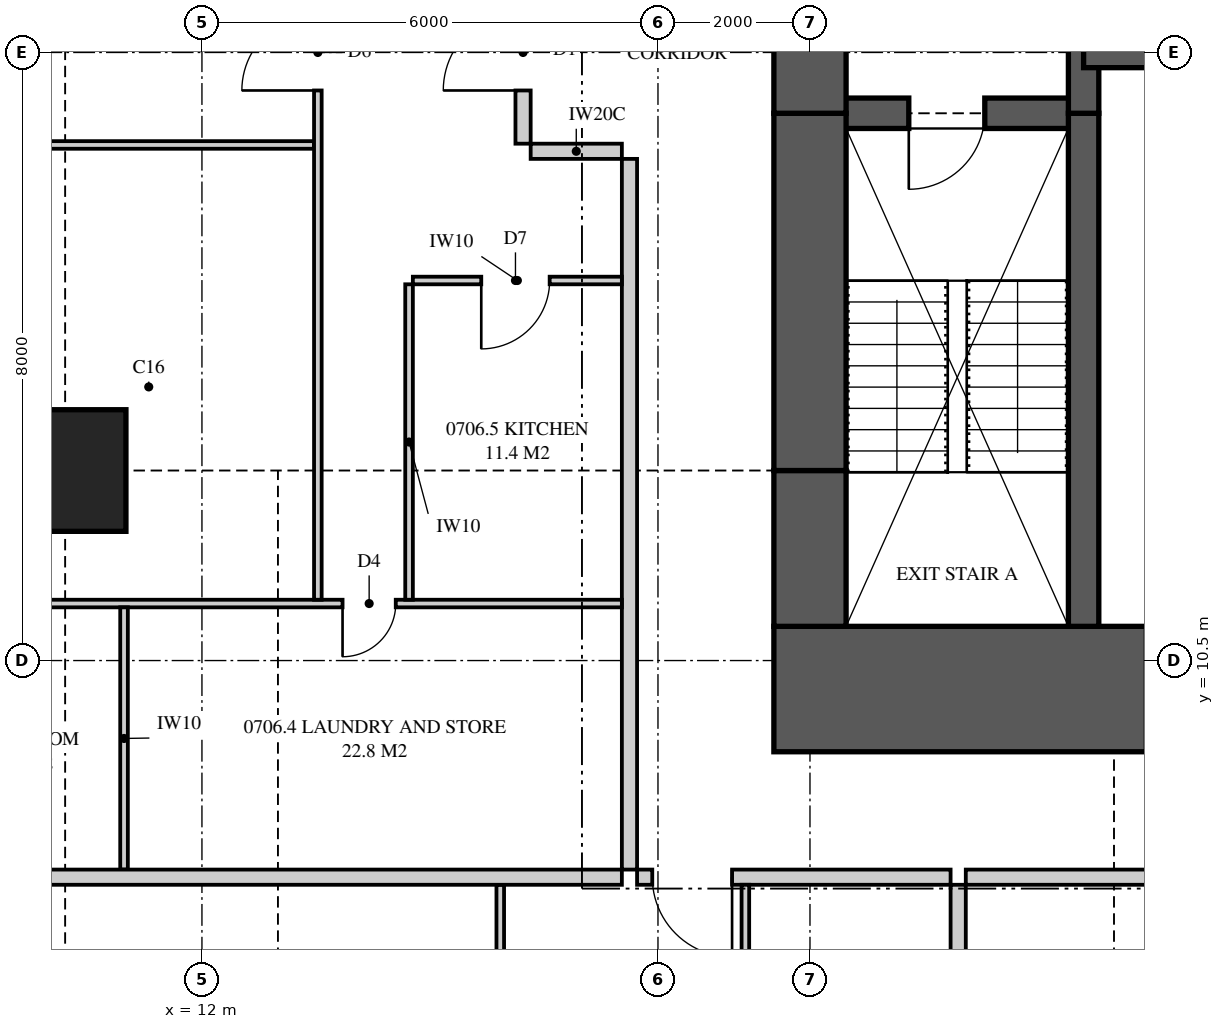
"""IFC4 building model, lengths in metres.
Left out: names, types, materials, properties, quantities, classifications, styles, units other than length and angle.
Written with IfcOpenShell. Run it as: python <this file> out.ifc"""

import sys

from ifc_helpers import new_model, si_unit, direction, frame, frame_2d, origin, origin_2d, place, context, subcontext, project, spatial, polyline, rectangle, outline, extrude, element, fill, save


model = new_model("IFC4")
c1 = context("Model", 3, precision=1e-05, world=origin(), true_north=direction((0.0, 1.0)))
c2 = subcontext(c1, "Body", "Model", "MODEL_VIEW")
j1 = project(units=[si_unit("LENGTHUNIT", "METRE"), si_unit("PLANEANGLEUNIT", "RADIAN")], contexts=[c1])
p1 = place(None, origin())
s1 = spatial("IfcSite", under=j1, at=p1, CompositionType="ELEMENT")
p2 = place(p1, origin())
s2 = spatial("IfcBuilding", under=s1, at=p2, CompositionType="ELEMENT")
p3 = place(p2, frame((0.0, 0.0, 31.05)))
s3 = spatial("IfcBuildingStorey", under=s2, at=p3, CompositionType="ELEMENT", Elevation=31.05)
p4 = place(p3, frame((10.2, 13.0, 0.0), z_axis=(0.0, 0.0, 1.0), x_axis=(1.0, 0.0, 0.0)))
e1 = element("IfcColumn", 1, at=p4, inside=s3, PredefinedType="COLUMN", context=c2, shape_type="SweptSolid", body=[
    extrude(rectangle(XDim=1.6, YDim=1.6, at=origin_2d()), origin(), (0.0, 0.0, 1.0), 3.35),
])
p5 = place(p3, frame((19.525, 10.125, 0.0), z_axis=(0.0, 0.0, 1.0), x_axis=(1.0, 0.0, 0.0)))
e2 = element("IfcWall", 2, at=p5, inside=s3, PredefinedType="SHEAR", context=c2, shape_type="SweptSolid", body=[
    extrude(rectangle(XDim=6.475, YDim=1.65, at=frame_2d((3.238, 0.0))), origin(), (0.0, 0.0, 1.0), 3.35),
])
p6 = place(p5, frame((4.9, 0.0, 0.0)))
e3 = element("IfcOpeningElement", 3, at=p6, cuts=e2, PredefinedType="OPENING", context=c2, shape_type="SweptSolid", body=[
    extrude(rectangle(XDim=0.75, YDim=2.1, at=frame_2d((0.375, 1.05))), frame((0.0, 0.835, 0.0), z_axis=(0.0, -1.0, 0.0), x_axis=(1.0, 0.0, 0.0)), (0.0, 0.0, 1.0), 1.67),
])
p7 = place(p3, frame((20.0, 23.3, 0.0), z_axis=(0.0, 0.0, 1.0), x_axis=(0.0, -1.0, 0.0)))
e4 = element("IfcWall", 4, at=p7, inside=s3, PredefinedType="SHEAR", context=c2, shape_type="SweptSolid", body=[
    extrude(rectangle(XDim=5.6, YDim=0.95, at=frame_2d((2.8, 0.0))), origin(), (0.0, 0.0, 1.0), 3.35),
])
p8 = place(p7, frame((3.4, 0.0, 0.0)))
e5 = element("IfcOpeningElement", 5, at=p8, cuts=e4, PredefinedType="OPENING", context=c2, shape_type="SweptSolid", body=[
    extrude(rectangle(XDim=1.2, YDim=2.2, at=frame_2d((0.6, 1.1))), frame((0.0, 0.485, 0.0), z_axis=(0.0, -1.0, 0.0), x_axis=(1.0, 0.0, 0.0)), (0.0, 0.0, 1.0), 0.97),
])
p9 = place(p3, frame((20.0, 17.7, 0.0), z_axis=(0.0, 0.0, 1.0), x_axis=(0.0, -1.0, 0.0)))
e6 = element("IfcWall", 6, at=p9, inside=s3, PredefinedType="SHEAR", context=c2, shape_type="SweptSolid", body=[
    extrude(rectangle(XDim=4.7, YDim=0.95, at=frame_2d((2.35, 0.0))), origin(), (0.0, 0.0, 1.0), 3.35),
])
p10 = place(p3, frame((20.0, 13.0, 0.0), z_axis=(0.0, 0.0, 1.0), x_axis=(0.0, -1.0, 0.0)))
e7 = element("IfcWall", 7, at=p10, inside=s3, PredefinedType="SHEAR", context=c2, shape_type="SweptSolid", body=[
    extrude(rectangle(XDim=2.05, YDim=0.95, at=frame_2d((1.025, 0.0))), origin(), (0.0, 0.0, 1.0), 3.35),
])
p11 = place(p3, frame((23.6, 10.95, 0.0), z_axis=(0.0, 0.0, 1.0), x_axis=(0.0, 1.0, 0.0)))
e8 = element("IfcWall", 8, at=p11, inside=s3, PredefinedType="SHEAR", context=c2, shape_type="SweptSolid", body=[
    extrude(rectangle(XDim=6.75, YDim=0.4, at=frame_2d((3.375, 0.0))), origin(), (0.0, 0.0, 1.0), 3.35),
])
p12 = place(p3, frame((23.6, 17.7, 0.0), z_axis=(0.0, 0.0, 1.0), x_axis=(0.0, 1.0, 0.0)))
e9 = element("IfcWall", 9, at=p12, inside=s3, PredefinedType="SHEAR", context=c2, shape_type="SweptSolid", body=[
    extrude(rectangle(XDim=5.6, YDim=0.4, at=frame_2d((2.8, 0.0))), origin(), (0.0, 0.0, 1.0), 3.35),
])
p13 = place(p3, frame((20.0, 17.7, 0.0), z_axis=(0.0, 0.0, 1.0), x_axis=(1.0, 0.0, 0.0)))
e10 = element("IfcWall", 10, at=p13, inside=s3, PredefinedType="SHEAR", context=c2, shape_type="SweptSolid", body=[
    extrude(rectangle(XDim=3.6, YDim=0.4, at=frame_2d((1.8, 0.0))), origin(), (0.0, 0.0, 1.0), 3.35),
])
p14 = place(p13, frame((1.3, 0.0, 0.0)))
e11 = element("IfcOpeningElement", 11, at=p14, cuts=e10, PredefinedType="OPENING", context=c2, shape_type="SweptSolid", body=[
    extrude(rectangle(XDim=1.0, YDim=2.1, at=frame_2d((0.5, 1.05))), frame((0.0, 0.21, 0.0), z_axis=(0.0, -1.0, 0.0), x_axis=(1.0, 0.0, 0.0)), (0.0, 0.0, 1.0), 0.42),
])
p15 = place(p3, frame((23.6, 18.5, 0.0), z_axis=(0.0, 0.0, 1.0), x_axis=(1.0, 0.0, 0.0)))
e12 = element("IfcWall", 12, at=p15, inside=s3, PredefinedType="SHEAR", context=c2, shape_type="SweptSolid", body=[
    extrude(rectangle(XDim=2.4, YDim=0.4, at=frame_2d((1.2, 0.0))), origin(), (0.0, 0.0, 1.0), 3.35),
])
p16 = place(p3, frame((21.95, 0.175, 0.0), z_axis=(0.0, 0.0, 1.0), x_axis=(0.0, 1.0, 0.0)))
e13 = element("IfcWall", 13, at=p16, inside=s3, PredefinedType="PARTITIONING", context=c2, shape_type="SweptSolid", body=[
    extrude(outline(polyline([(0.529, 2.15), (0.0, 2.15), (0.0, 0.0), (0.529, 0.0), (0.529, 0.09), (1.021, 0.09), (1.021, 0.0), (7.375, 0.0), (7.375, 3.11), (1.685, 3.11), (1.685, 2.15), (1.021, 2.15), (1.021, 2.06), (0.529, 2.06), (0.529, 2.15)])), frame((0.0, 0.1, 0.0), z_axis=(0.0, -1.0, 0.0), x_axis=(1.0, 0.0, 0.0)), (0.0, 0.0, 1.0), 0.2),
])
p17 = place(p3, frame((17.725, 7.65, 0.0), z_axis=(0.0, 0.0, 1.0), x_axis=(1.0, 0.0, 0.0)))
e14 = element("IfcWall", 14, at=p17, inside=s3, PredefinedType="PARTITIONING", context=c2, shape_type="SweptSolid", body=[
    extrude(rectangle(XDim=4.125, YDim=0.2, at=frame_2d((2.062, 0.0))), origin(), (0.0, 0.0, 1.0), 3.11),
])
p18 = place(p17, frame((0.2, 0.0, 0.0)))
e15 = element("IfcOpeningElement", 15, at=p18, cuts=e14, PredefinedType="OPENING", context=c2, shape_type="SweptSolid", body=[
    extrude(rectangle(XDim=1.05, YDim=2.2, at=frame_2d((0.525, 1.1))), frame((0.0, 0.11, 0.0), z_axis=(0.0, -1.0, 0.0), x_axis=(1.0, 0.0, 0.0)), (0.0, 0.0, 1.0), 0.22),
])
p19 = place(p3, frame((19.15, 4.6, 0.0), z_axis=(0.0, 0.0, 1.0), x_axis=(0.0, 1.0, 0.0)))
e16 = element("IfcWall", 16, at=p19, inside=s3, PredefinedType="PARTITIONING", context=c2, shape_type="SweptSolid", body=[
    extrude(rectangle(XDim=2.95, YDim=0.1, at=frame_2d((1.475, 0.0))), origin(), (0.0, 0.0, 1.0), 3.11),
])
p20 = place(p3, frame((15.925, 0.175, 0.0), z_axis=(0.0, 0.0, 1.0), x_axis=(0.0, 1.0, 0.0)))
e17 = element("IfcWall", 17, at=p20, inside=s3, PredefinedType="PARTITIONING", context=c2, shape_type="SweptSolid", body=[
    extrude(outline(polyline([(0.0, 0.0), (7.375, 0.0), (7.375, 3.11), (1.635, 3.11), (1.635, 2.15), (0.0, 2.15), (0.0, 3.11), (0.0, 0.0)])), frame((0.0, 0.05, 0.0), z_axis=(0.0, -1.0, 0.0), x_axis=(1.0, 0.0, 0.0)), (0.0, 0.0, 1.0), 0.1),
])
p21 = place(p20, frame((3.188, 0.0, 0.0)))
e18 = element("IfcOpeningElement", 18, at=p21, cuts=e17, PredefinedType="OPENING", context=c2, shape_type="SweptSolid", body=[
    extrude(rectangle(XDim=1.0, YDim=2.1, at=frame_2d((0.5, 1.05))), frame((0.0, 0.06, 0.0), z_axis=(0.0, -1.0, 0.0), x_axis=(1.0, 0.0, 0.0)), (0.0, 0.0, 1.0), 0.12),
])
p22 = place(p3, frame((22.05, 7.65, 0.0), z_axis=(0.0, 0.0, 1.0), x_axis=(1.0, 0.0, 0.0)))
e19 = element("IfcWall", 19, at=p22, inside=s3, PredefinedType="PARTITIONING", context=c2, shape_type="SweptSolid", body=[
    extrude(outline(polyline([(0.0, 0.0), (4.2, 0.0), (4.2, 3.11), (2.287, 3.11), (2.287, 2.541), (1.613, 2.541), (1.613, 3.11), (0.0, 3.11), (0.0, 0.0)])), frame((0.0, 0.1, 0.0), z_axis=(0.0, -1.0, 0.0), x_axis=(1.0, 0.0, 0.0)), (0.0, 0.0, 1.0), 0.2),
])
p23 = place(p3, frame((2.0, 7.65, 0.0), z_axis=(0.0, 0.0, 1.0), x_axis=(1.0, 0.0, 0.0)))
e20 = element("IfcWall", 20, at=p23, inside=s3, PredefinedType="PARTITIONING", context=c2, shape_type="SweptSolid", body=[
    extrude(outline(polyline([(0.0, 0.0), (15.525, 0.0), (15.525, 3.11), (11.337, 3.11), (11.337, 2.541), (10.663, 2.541), (10.663, 3.11), (9.51, 3.11), (9.51, 2.51), (6.89, 2.51), (6.89, 3.11), (2.969, 3.11), (2.969, 2.541), (2.74, 2.541), (2.74, 2.15), (0.896, 2.15), (0.896, 3.11), (0.0, 3.11), (0.0, 0.0)])), frame((0.0, 0.1, 0.0), z_axis=(0.0, -1.0, 0.0), x_axis=(1.0, 0.0, 0.0)), (0.0, 0.0, 1.0), 0.2),
])
p24 = place(p3, frame((17.625, 7.75, 0.0), z_axis=(0.0, 0.0, 1.0), x_axis=(0.0, 1.0, 0.0)))
e21 = element("IfcWall", 21, at=p24, inside=s3, PredefinedType="PARTITIONING", context=c2, shape_type="SweptSolid", body=[
    extrude(outline(polyline([(0.0, 0.0), (9.35, 0.0), (9.35, 3.11), (5.587, 3.11), (5.587, 2.541), (4.913, 2.541), (4.913, 3.11), (0.0, 3.11), (0.0, 0.0)])), frame((0.0, 0.1, 0.0), z_axis=(0.0, -1.0, 0.0), x_axis=(1.0, 0.0, 0.0)), (0.0, 0.0, 1.0), 0.2),
])
p25 = place(p3, frame((2.175, 11.25, 0.0), z_axis=(0.0, 0.0, 1.0), x_axis=(1.0, 0.0, 0.0)))
e22 = element("IfcWall", 22, at=p25, inside=s3, PredefinedType="PARTITIONING", context=c2, shape_type="SweptSolid", body=[
    extrude(outline(polyline([(0.188, 3.11), (0.0, 3.11), (0.0, 0.0), (0.529, 0.0), (0.529, 0.263), (1.021, 0.263), (1.021, 0.0), (15.35, 0.0), (15.35, 3.11), (11.112, 3.11), (11.112, 2.541), (10.538, 2.541), (10.538, 3.11), (9.285, 3.11), (9.285, 2.51), (6.765, 2.51), (6.765, 3.11), (2.744, 3.11), (2.744, 2.541), (2.169, 2.541), (2.169, 3.11), (1.93, 3.11), (1.93, 2.15), (1.021, 2.15), (1.021, 1.887), (0.529, 1.887), (0.529, 2.15), (0.188, 2.15), (0.188, 3.11)])), frame((0.0, 0.05, 0.0), z_axis=(0.0, -1.0, 0.0), x_axis=(1.0, 0.0, 0.0)), (0.0, 0.0, 1.0), 0.1),
])
p26 = place(p25, frame((4.85, 0.0, 0.0)))
e23 = element("IfcOpeningElement", 23, at=p26, cuts=e22, PredefinedType="OPENING", context=c2, shape_type="SweptSolid", body=[
    extrude(rectangle(XDim=0.9, YDim=2.1, at=frame_2d((0.45, 1.05))), frame((0.0, 0.06, 0.0), z_axis=(0.0, -1.0, 0.0), x_axis=(1.0, 0.0, 0.0)), (0.0, 0.0, 1.0), 0.12),
])
p27 = place(p25, frame((6.25, 0.0, 0.0)))
e24 = element("IfcOpeningElement", 24, at=p27, cuts=e22, PredefinedType="OPENING", context=c2, shape_type="SweptSolid", body=[
    extrude(rectangle(XDim=0.9, YDim=2.1, at=frame_2d((0.45, 1.05))), frame((0.0, 0.06, 0.0), z_axis=(0.0, -1.0, 0.0), x_axis=(1.0, 0.0, 0.0)), (0.0, 0.0, 1.0), 0.12),
])
p28 = place(p25, frame((11.675, 0.0, 0.0)))
e25 = element("IfcOpeningElement", 25, at=p28, cuts=e22, PredefinedType="OPENING", context=c2, shape_type="SweptSolid", body=[
    extrude(rectangle(XDim=0.7, YDim=2.1, at=frame_2d((0.35, 1.05))), frame((0.0, 0.06, 0.0), z_axis=(0.0, -1.0, 0.0), x_axis=(1.0, 0.0, 0.0)), (0.0, 0.0, 1.0), 0.12),
])
p29 = place(p3, frame((10.975, 7.75, 0.0), z_axis=(0.0, 0.0, 1.0), x_axis=(0.0, 1.0, 0.0)))
e26 = element("IfcWall", 26, at=p29, inside=s3, PredefinedType="PARTITIONING", context=c2, shape_type="SweptSolid", body=[
    extrude(outline(polyline([(0.0, 0.0), (3.45, 0.0), (3.45, 3.11), (3.45, 2.51), (0.0, 2.51), (0.0, 3.11), (0.0, 0.0)])), frame((0.0, 0.05, 0.0), z_axis=(0.0, -1.0, 0.0), x_axis=(1.0, 0.0, 0.0)), (0.0, 0.0, 1.0), 0.1),
])
p30 = place(p3, frame((13.525, 11.3, 0.0), z_axis=(0.0, 0.0, 1.0), x_axis=(0.0, 1.0, 0.0)))
e27 = element("IfcWall", 27, at=p30, inside=s3, PredefinedType="PARTITIONING", context=c2, shape_type="SweptSolid", body=[
    extrude(outline(polyline([(0.0, 0.0), (17.95, 0.0), (17.95, 3.11), (13.987, 3.11), (13.987, 2.541), (13.413, 2.541), (13.413, 3.11), (1.987, 3.11), (1.987, 2.541), (1.413, 2.541), (1.413, 3.11), (0.0, 3.11), (0.0, 0.0)])), frame((0.0, 0.05, 0.0), z_axis=(0.0, -1.0, 0.0), x_axis=(1.0, 0.0, 0.0)), (0.0, 0.0, 1.0), 0.1),
])
p31 = place(p30, frame((6.7, 0.0, 0.0)))
e28 = element("IfcOpeningElement", 28, at=p31, cuts=e27, PredefinedType="OPENING", context=c2, shape_type="SweptSolid", body=[
    extrude(rectangle(XDim=1.0, YDim=2.1, at=frame_2d((0.5, 1.05))), frame((0.0, 0.06, 0.0), z_axis=(0.0, -1.0, 0.0), x_axis=(1.0, 0.0, 0.0)), (0.0, 0.0, 1.0), 0.12),
])
p32 = place(p3, frame((14.725, 11.3, 0.0), z_axis=(0.0, 0.0, 1.0), x_axis=(0.0, 1.0, 0.0)))
e29 = element("IfcWall", 29, at=p32, inside=s3, PredefinedType="PARTITIONING", context=c2, shape_type="SweptSolid", body=[
    extrude(outline(polyline([(0.0, 0.0), (4.15, 0.0), (4.15, 3.11), (1.987, 3.11), (1.987, 2.541), (1.413, 2.541), (1.413, 3.11), (0.0, 3.11), (0.0, 0.0)])), frame((0.0, 0.05, 0.0), z_axis=(0.0, -1.0, 0.0), x_axis=(1.0, 0.0, 0.0)), (0.0, 0.0, 1.0), 0.1),
])
p33 = place(p3, frame((14.775, 15.5, 0.0), z_axis=(0.0, 0.0, 1.0), x_axis=(1.0, 0.0, 0.0)))
e30 = element("IfcWall", 30, at=p33, inside=s3, PredefinedType="PARTITIONING", context=c2, shape_type="SweptSolid", body=[
    extrude(rectangle(XDim=2.75, YDim=0.1, at=frame_2d((1.375, 0.0))), origin(), (0.0, 0.0, 1.0), 3.11),
])
p34 = place(p33, frame((0.9, 0.0, 0.0)))
e31 = element("IfcOpeningElement", 31, at=p34, cuts=e30, PredefinedType="OPENING", context=c2, shape_type="SweptSolid", body=[
    extrude(rectangle(XDim=0.9, YDim=2.1, at=frame_2d((0.45, 1.05))), frame((0.0, 0.06, 0.0), z_axis=(0.0, -1.0, 0.0), x_axis=(1.0, 0.0, 0.0)), (0.0, 0.0, 1.0), 0.12),
])
p35 = place(p3, frame((2.175, 17.283, 0.0), z_axis=(0.0, 0.0, 1.0), x_axis=(1.0, 0.0, 0.0)))
e32 = element("IfcWall", 32, at=p35, inside=s3, PredefinedType="PARTITIONING", context=c2, shape_type="SweptSolid", body=[
    extrude(outline(polyline([(0.0, 0.0), (11.3, 0.0), (11.3, 3.11), (9.285, 3.11), (9.285, 2.51), (6.765, 2.51), (6.765, 3.11), (1.635, 3.11), (1.635, 2.15), (0.0, 2.15), (0.0, 3.11), (0.0, 0.0)])), frame((0.0, 0.05, 0.0), z_axis=(0.0, -1.0, 0.0), x_axis=(1.0, 0.0, 0.0)), (0.0, 0.0, 1.0), 0.1),
])
p36 = place(p35, frame((5.15, 0.0, 0.0)))
e33 = element("IfcOpeningElement", 33, at=p36, cuts=e32, PredefinedType="OPENING", context=c2, shape_type="SweptSolid", body=[
    extrude(rectangle(XDim=1.0, YDim=2.1, at=frame_2d((0.5, 1.05))), frame((0.0, 0.06, 0.0), z_axis=(0.0, -1.0, 0.0), x_axis=(1.0, 0.0, 0.0)), (0.0, 0.0, 1.0), 0.12),
])
p37 = place(p3, frame((16.225, 17.3, 0.0), z_axis=(0.0, 0.0, 1.0), x_axis=(0.0, 1.0, 0.0)))
e34 = element("IfcWall", 34, at=p37, inside=s3, PredefinedType="PARTITIONING", context=c2, shape_type="SweptSolid", body=[
    extrude(rectangle(XDim=2.4, YDim=0.2, at=frame_2d((1.2, 0.0))), origin(), (0.0, 0.0, 1.0), 3.11),
])
p38 = place(p37, frame((0.7, 0.0, 0.0)))
e35 = element("IfcOpeningElement", 35, at=p38, cuts=e34, PredefinedType="OPENING", context=c2, shape_type="SweptSolid", body=[
    extrude(rectangle(XDim=1.05, YDim=2.2, at=frame_2d((0.525, 1.1))), frame((0.0, 0.11, 0.0), z_axis=(0.0, -1.0, 0.0), x_axis=(1.0, 0.0, 0.0)), (0.0, 0.0, 1.0), 0.22),
])
p39 = place(p3, frame((17.525, 17.2, 0.0), z_axis=(0.0, 0.0, 1.0), x_axis=(-1.0, 0.0, 0.0)))
e36 = element("IfcWall", 36, at=p39, inside=s3, PredefinedType="PARTITIONING", context=c2, shape_type="SweptSolid", body=[
    extrude(rectangle(XDim=1.2, YDim=0.2, at=frame_2d((0.6, 0.0))), origin(), (0.0, 0.0, 1.0), 3.11),
])
p40 = place(p18, frame((1.05, 0.0, 0.0), z_axis=(0.0, 0.0, 1.0), x_axis=(-1.0, 0.0, 0.0)))
e37 = element("IfcDoor", 37, at=p40, inside=s3, OperationType="SINGLE_SWING_LEFT", PredefinedType="DOOR", context=c2, shape_type="SweptSolid", body=[
    extrude(rectangle(XDim=1.05, YDim=2.2, at=frame_2d((0.525, 1.1))), frame((0.0, 0.025, 0.0), z_axis=(0.0, -1.0, 0.0), x_axis=(1.0, 0.0, 0.0)), (0.0, 0.0, 1.0), 0.05),
])
fill(e15, e37)
p41 = place(p38, origin())
e38 = element("IfcDoor", 38, at=p41, inside=s3, OperationType="SINGLE_SWING_LEFT", PredefinedType="DOOR", context=c2, shape_type="SweptSolid", body=[
    extrude(rectangle(XDim=1.05, YDim=2.2, at=frame_2d((0.525, 1.1))), frame((0.0, 0.025, 0.0), z_axis=(0.0, -1.0, 0.0), x_axis=(1.0, 0.0, 0.0)), (0.0, 0.0, 1.0), 0.05),
])
fill(e35, e38)
p42 = place(p28, frame((0.7, 0.0, 0.0), z_axis=(0.0, 0.0, 1.0), x_axis=(-1.0, 0.0, 0.0)))
e39 = element("IfcDoor", 39, at=p42, inside=s3, OperationType="SINGLE_SWING_RIGHT", PredefinedType="DOOR", context=c2, shape_type="SweptSolid", body=[
    extrude(rectangle(XDim=0.7, YDim=2.1, at=frame_2d((0.35, 1.05))), frame((0.0, 0.025, 0.0), z_axis=(0.0, -1.0, 0.0), x_axis=(1.0, 0.0, 0.0)), (0.0, 0.0, 1.0), 0.05),
])
fill(e25, e39)
p43 = place(p34, frame((0.9, 0.0, 0.0), z_axis=(0.0, 0.0, 1.0), x_axis=(-1.0, 0.0, 0.0)))
e40 = element("IfcDoor", 40, at=p43, inside=s3, OperationType="SINGLE_SWING_RIGHT", PredefinedType="DOOR", context=c2, shape_type="SweptSolid", body=[
    extrude(rectangle(XDim=0.9, YDim=2.1, at=frame_2d((0.45, 1.05))), frame((0.0, 0.025, 0.0), z_axis=(0.0, -1.0, 0.0), x_axis=(1.0, 0.0, 0.0)), (0.0, 0.0, 1.0), 0.05),
])
fill(e31, e40)
p44 = place(p31, origin())
e41 = element("IfcDoor", 41, at=p44, inside=s3, OperationType="SINGLE_SWING_LEFT", PredefinedType="DOOR", context=c2, shape_type="SweptSolid", body=[
    extrude(rectangle(XDim=1.0, YDim=2.1, at=frame_2d((0.5, 1.05))), frame((0.0, 0.025, 0.0), z_axis=(0.0, -1.0, 0.0), x_axis=(1.0, 0.0, 0.0)), (0.0, 0.0, 1.0), 0.05),
])
fill(e28, e41)
p45 = place(p14, frame((1.0, 0.0, 0.0), z_axis=(0.0, 0.0, 1.0), x_axis=(-1.0, 0.0, 0.0)))
e42 = element("IfcDoor", 42, at=p45, inside=s3, OperationType="SINGLE_SWING_RIGHT", PredefinedType="DOOR", context=c2, shape_type="SweptSolid", body=[
    extrude(rectangle(XDim=1.0, YDim=2.1, at=frame_2d((0.5, 1.05))), frame((0.0, 0.025, 0.0), z_axis=(0.0, -1.0, 0.0), x_axis=(1.0, 0.0, 0.0)), (0.0, 0.0, 1.0), 0.05),
])
fill(e11, e42)
save(model, sys.argv[1])
